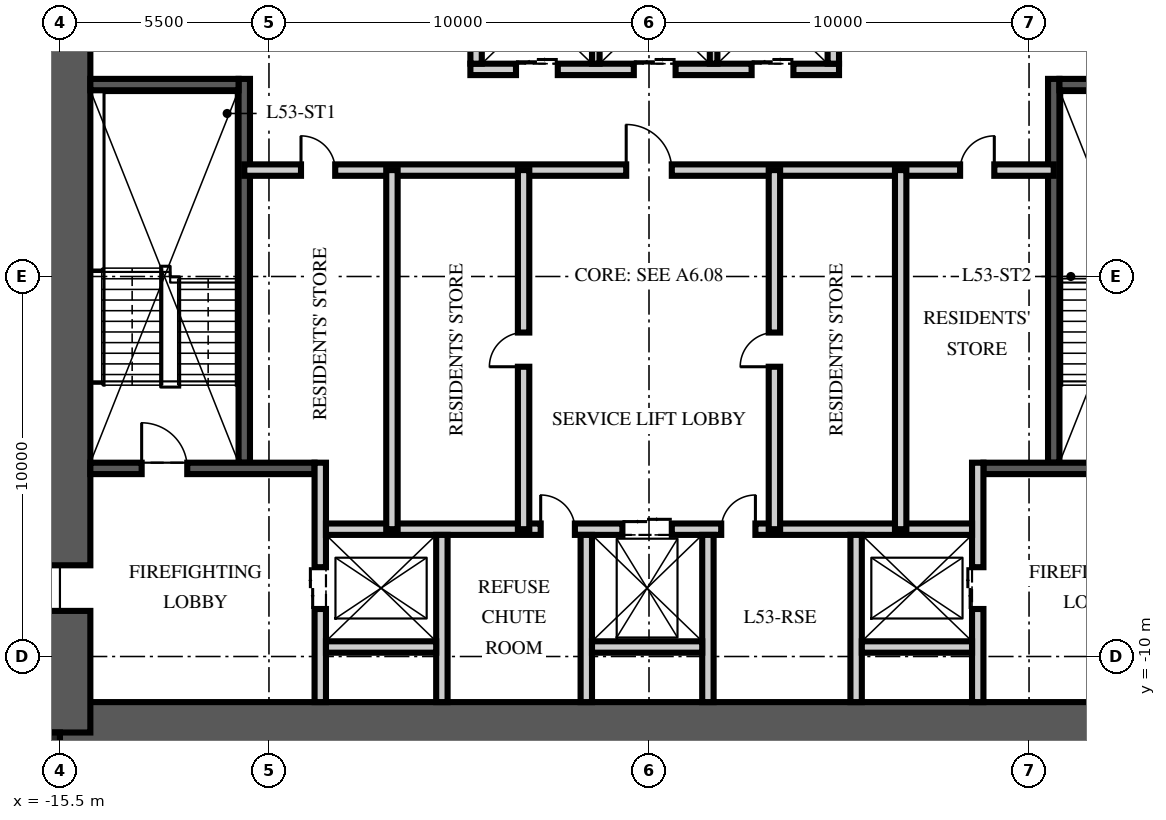
"""IFC4 building model, lengths in metres.
Left out: names, types, materials, properties, quantities, classifications, styles, units other than length and angle.
Written with IfcOpenShell. Run it as: python <this file> out.ifc"""

import sys

from ifc_helpers import new_model, si_unit, direction, frame, frame_2d, origin, origin_2d, place, context, subcontext, project, spatial, rectangle, extrude, element, fill, save


model = new_model("IFC4")
c1 = context("Model", 3, precision=1e-05, world=origin(), true_north=direction((0.0, 1.0)))
c2 = subcontext(c1, "Body", "Model", "MODEL_VIEW")
j1 = project(units=[si_unit("LENGTHUNIT", "METRE"), si_unit("PLANEANGLEUNIT", "RADIAN")], contexts=[c1])
p1 = place(None, origin())
s1 = spatial("IfcSite", under=j1, at=p1, CompositionType="ELEMENT")
p2 = place(p1, origin())
s2 = spatial("IfcBuilding", under=s1, at=p2, CompositionType="ELEMENT")
p3 = place(p2, frame((0.0, 0.0, 214.5)))
s3 = spatial("IfcBuildingStorey", under=s2, at=p3, CompositionType="ELEMENT", Elevation=214.5)
p4 = place(p3, frame((-15.5, -12.0, -0.25), z_axis=(0.0, 0.0, 1.0), x_axis=(1.0, 0.0, 0.0)))
e1 = element("IfcWall", 1, at=p4, inside=s3, PredefinedType="SHEAR", context=c2, shape_type="SweptSolid", body=[
    extrude(rectangle(XDim=31.0, YDim=1.6, at=frame_2d((15.5, 0.0))), origin(), (0.0, 0.0, 1.0), 3.75),
])
p5 = place(p3, frame((-15.5, -12.0, -0.25), z_axis=(0.0, 0.0, 1.0), x_axis=(0.0, 1.0, 0.0)))
e2 = element("IfcWall", 2, at=p5, inside=s3, PredefinedType="SHEAR", context=c2, shape_type="SweptSolid", body=[
    extrude(rectangle(XDim=24.0, YDim=1.6, at=frame_2d((12.0, 0.0))), origin(), (0.0, 0.0, 1.0), 3.75),
])
p6 = place(p5, frame((3.2, 0.0, 0.25)))
e3 = element("IfcOpeningElement", 3, at=p6, cuts=e2, PredefinedType="OPENING", context=c2, shape_type="SweptSolid", body=[
    extrude(rectangle(XDim=1.2, YDim=2.1, at=frame_2d((0.6, 1.05))), frame((0.0, 0.81, 0.0), z_axis=(0.0, -1.0, 0.0), x_axis=(1.0, 0.0, 0.0)), (0.0, 0.0, 1.0), 1.62),
])
p7 = place(p5, frame((19.3, 0.0, 0.25)))
e4 = element("IfcOpeningElement", 4, at=p7, cuts=e2, PredefinedType="OPENING", context=c2, shape_type="SweptSolid", body=[
    extrude(rectangle(XDim=1.8, YDim=2.1, at=frame_2d((0.9, 1.05))), frame((0.0, 0.81, 0.0), z_axis=(0.0, -1.0, 0.0), x_axis=(1.0, 0.0, 0.0)), (0.0, 0.0, 1.0), 1.62),
])
p8 = place(p3, frame((-15.9, -12.4, -0.25), z_axis=(0.0, 0.0, 1.0), x_axis=(1.0, 0.0, 0.0)))
e5 = element("IfcColumn", 5, at=p8, inside=s3, PredefinedType="COLUMN", context=c2, shape_type="SweptSolid", body=[
    extrude(rectangle(XDim=0.8, YDim=0.8, at=origin_2d()), origin(), (0.0, 0.0, 1.0), 3.75),
])
p9 = place(p3, frame((-10.65, -4.9, 0.0), z_axis=(0.0, 0.0, 1.0), x_axis=(0.0, 1.0, 0.0)))
e6 = element("IfcWall", 6, at=p9, inside=s3, PredefinedType="SOLIDWALL", context=c2, shape_type="SweptSolid", body=[
    extrude(rectangle(XDim=10.1, YDim=0.3, at=frame_2d((5.05, 0.0))), origin(), (0.0, 0.0, 1.0), 3.5),
])
p10 = place(p3, frame((-14.7, -5.05, 0.0), z_axis=(0.0, 0.0, 1.0), x_axis=(1.0, 0.0, 0.0)))
e7 = element("IfcWall", 7, at=p10, inside=s3, PredefinedType="SOLIDWALL", context=c2, shape_type="SweptSolid", body=[
    extrude(rectangle(XDim=5.9, YDim=0.3, at=frame_2d((2.95, 0.0))), origin(), (0.0, 0.0, 1.0), 3.5),
])
p11 = place(p10, frame((1.35, 0.0, 0.0)))
e8 = element("IfcOpeningElement", 8, at=p11, cuts=e7, PredefinedType="OPENING", context=c2, shape_type="SweptSolid", body=[
    extrude(rectangle(XDim=1.2, YDim=2.1, at=frame_2d((0.6, 1.05))), frame((0.0, 0.16, 0.0), z_axis=(0.0, -1.0, 0.0), x_axis=(1.0, 0.0, 0.0)), (0.0, 0.0, 1.0), 0.32),
])
p12 = place(p3, frame((-14.7, 5.05, 0.0), z_axis=(0.0, 0.0, 1.0), x_axis=(1.0, 0.0, 0.0)))
e9 = element("IfcWall", 9, at=p12, inside=s3, PredefinedType="SOLIDWALL", context=c2, shape_type="SweptSolid", body=[
    extrude(rectangle(XDim=3.9, YDim=0.3, at=frame_2d((1.95, 0.0))), origin(), (0.0, 0.0, 1.0), 3.5),
])
p13 = place(p3, frame((-8.65, -11.2, 0.0), z_axis=(0.0, 0.0, 1.0), x_axis=(0.0, 1.0, 0.0)))
e10 = element("IfcWall", 10, at=p13, inside=s3, PredefinedType="PARTITIONING", context=c2, shape_type="SweptSolid", body=[
    extrude(rectangle(XDim=6.3, YDim=0.3, at=frame_2d((3.15, 0.0))), origin(), (0.0, 0.0, 1.0), 3.5),
])
p14 = place(p13, frame((2.45, 0.0, 0.0)))
e11 = element("IfcOpeningElement", 11, at=p14, cuts=e10, PredefinedType="OPENING", context=c2, shape_type="SweptSolid", body=[
    extrude(rectangle(XDim=1.1, YDim=2.1, at=frame_2d((0.55, 1.05))), frame((0.0, 0.16, 0.0), z_axis=(0.0, -1.0, 0.0), x_axis=(1.0, 0.0, 0.0)), (0.0, 0.0, 1.0), 0.32),
])
p15 = place(p3, frame((10.65, -4.9, 0.0), z_axis=(0.0, 0.0, 1.0), x_axis=(0.0, 1.0, 0.0)))
e12 = element("IfcWall", 12, at=p15, inside=s3, PredefinedType="SOLIDWALL", context=c2, shape_type="SweptSolid", body=[
    extrude(rectangle(XDim=10.1, YDim=0.3, at=frame_2d((5.05, 0.0))), origin(), (0.0, 0.0, 1.0), 3.5),
])
p16 = place(p3, frame((14.7, -5.05, 0.0), z_axis=(0.0, 0.0, 1.0), x_axis=(-1.0, 0.0, 0.0)))
e13 = element("IfcWall", 13, at=p16, inside=s3, PredefinedType="SOLIDWALL", context=c2, shape_type="SweptSolid", body=[
    extrude(rectangle(XDim=5.9, YDim=0.3, at=frame_2d((2.95, 0.0))), origin(), (0.0, 0.0, 1.0), 3.5),
])
p17 = place(p16, frame((1.35, 0.0, 0.0)))
e14 = element("IfcOpeningElement", 14, at=p17, cuts=e13, PredefinedType="OPENING", context=c2, shape_type="SweptSolid", body=[
    extrude(rectangle(XDim=1.2, YDim=2.1, at=frame_2d((0.6, 1.05))), frame((0.0, 0.16, 0.0), z_axis=(0.0, -1.0, 0.0), x_axis=(1.0, 0.0, 0.0)), (0.0, 0.0, 1.0), 0.32),
])
p18 = place(p3, frame((14.7, 5.05, 0.0), z_axis=(0.0, 0.0, 1.0), x_axis=(-1.0, 0.0, 0.0)))
e15 = element("IfcWall", 15, at=p18, inside=s3, PredefinedType="SOLIDWALL", context=c2, shape_type="SweptSolid", body=[
    extrude(rectangle(XDim=3.9, YDim=0.3, at=frame_2d((1.95, 0.0))), origin(), (0.0, 0.0, 1.0), 3.5),
])
p19 = place(p3, frame((8.65, -11.2, 0.0), z_axis=(0.0, 0.0, 1.0), x_axis=(0.0, 1.0, 0.0)))
e16 = element("IfcWall", 16, at=p19, inside=s3, PredefinedType="PARTITIONING", context=c2, shape_type="SweptSolid", body=[
    extrude(rectangle(XDim=6.3, YDim=0.3, at=frame_2d((3.15, 0.0))), origin(), (0.0, 0.0, 1.0), 3.5),
])
p20 = place(p19, frame((2.45, 0.0, 0.0)))
e17 = element("IfcOpeningElement", 17, at=p20, cuts=e16, PredefinedType="OPENING", context=c2, shape_type="SweptSolid", body=[
    extrude(rectangle(XDim=1.1, YDim=2.1, at=frame_2d((0.55, 1.05))), frame((0.0, 0.16, 0.0), z_axis=(0.0, -1.0, 0.0), x_axis=(1.0, 0.0, 0.0)), (0.0, 0.0, 1.0), 0.32),
])
p21 = place(p3, frame((-8.5, -6.65, 0.0), z_axis=(0.0, 0.0, 1.0), x_axis=(1.0, 0.0, 0.0)))
e18 = element("IfcWall", 18, at=p21, inside=s3, PredefinedType="PARTITIONING", context=c2, shape_type="SweptSolid", body=[
    extrude(rectangle(XDim=17.0, YDim=0.3, at=frame_2d((8.5, 0.0))), origin(), (0.0, 0.0, 1.0), 3.5),
])
p22 = place(p21, frame((7.8, 0.0, 0.0)))
e19 = element("IfcOpeningElement", 19, at=p22, cuts=e18, PredefinedType="OPENING", context=c2, shape_type="SweptSolid", body=[
    extrude(rectangle(XDim=1.3, YDim=2.4, at=frame_2d((0.65, 1.2))), frame((0.0, 0.16, 0.0), z_axis=(0.0, -1.0, 0.0), x_axis=(1.0, 0.0, 0.0)), (0.0, 0.0, 1.0), 0.32),
])
p23 = place(p21, frame((5.65, 0.0, 0.0)))
e20 = element("IfcOpeningElement", 20, at=p23, cuts=e18, PredefinedType="OPENING", context=c2, shape_type="SweptSolid", body=[
    extrude(rectangle(XDim=0.9, YDim=2.1, at=frame_2d((0.45, 1.05))), frame((0.0, 0.16, 0.0), z_axis=(0.0, -1.0, 0.0), x_axis=(1.0, 0.0, 0.0)), (0.0, 0.0, 1.0), 0.32),
])
p24 = place(p21, frame((10.4, 0.0, 0.0)))
e21 = element("IfcOpeningElement", 21, at=p24, cuts=e18, PredefinedType="OPENING", context=c2, shape_type="SweptSolid", body=[
    extrude(rectangle(XDim=0.9, YDim=2.1, at=frame_2d((0.45, 1.05))), frame((0.0, 0.16, 0.0), z_axis=(0.0, -1.0, 0.0), x_axis=(1.0, 0.0, 0.0)), (0.0, 0.0, 1.0), 0.32),
])
for number, where, z_axis, x_axis in (
    (22, (-5.45, -11.2, 0.0), (0.0, 0.0, 1.0), (0.0, 1.0, 0.0)),
    (23, (-1.65, -11.2, 0.0), (0.0, 0.0, 1.0), (0.0, 1.0, 0.0)),
    (24, (1.55, -11.2, 0.0), (0.0, 0.0, 1.0), (0.0, 1.0, 0.0)),
    (25, (5.45, -11.2, 0.0), (0.0, 0.0, 1.0), (0.0, 1.0, 0.0)),
):
    element("IfcWall", number, at=place(p3, frame(where, z_axis=z_axis, x_axis=x_axis)), inside=s3, PredefinedType="PARTITIONING", context=c2, shape_type="SweptSolid", body=[
        extrude(rectangle(XDim=4.4, YDim=0.3, at=frame_2d((2.2, 0.0))), origin(), (0.0, 0.0, 1.0), 3.5),
    ])
for number, where, z_axis, x_axis in (
    (26, (-8.5, -9.75, 0.0), (0.0, 0.0, 1.0), (1.0, 0.0, 0.0)),
    (27, (-1.5, -9.75, 0.0), (0.0, 0.0, 1.0), (1.0, 0.0, 0.0)),
    (28, (5.6, -9.75, 0.0), (0.0, 0.0, 1.0), (1.0, 0.0, 0.0)),
):
    element("IfcWall", number, at=place(p3, frame(where, z_axis=z_axis, x_axis=x_axis)), inside=s3, PredefinedType="PARTITIONING", context=c2, shape_type="SweptSolid", body=[
        extrude(rectangle(XDim=2.9, YDim=0.3, at=frame_2d((1.45, 0.0))), origin(), (0.0, 0.0, 1.0), 3.5),
    ])
p25 = place(p3, frame((-4.7, 5.45, 0.0), z_axis=(0.0, 0.0, 1.0), x_axis=(1.0, 0.0, 0.0)))
e29 = element("IfcWall", 29, at=p25, inside=s3, PredefinedType="PARTITIONING", context=c2, shape_type="SweptSolid", body=[
    extrude(rectangle(XDim=9.7, YDim=0.3, at=frame_2d((4.85, 0.0))), origin(), (0.0, 0.0, 1.0), 3.5),
])
p26 = place(p25, frame((1.2, 0.0, 0.0)))
e30 = element("IfcOpeningElement", 30, at=p26, cuts=e29, PredefinedType="OPENING", context=c2, shape_type="SweptSolid", body=[
    extrude(rectangle(XDim=1.1, YDim=2.1, at=frame_2d((0.55, 1.05))), frame((0.0, 0.16, 0.0), z_axis=(0.0, -1.0, 0.0), x_axis=(1.0, 0.0, 0.0)), (0.0, 0.0, 1.0), 0.32),
])
p27 = place(p25, frame((4.3, 0.0, 0.0)))
e31 = element("IfcOpeningElement", 31, at=p27, cuts=e29, PredefinedType="OPENING", context=c2, shape_type="SweptSolid", body=[
    extrude(rectangle(XDim=1.1, YDim=2.1, at=frame_2d((0.55, 1.05))), frame((0.0, 0.16, 0.0), z_axis=(0.0, -1.0, 0.0), x_axis=(1.0, 0.0, 0.0)), (0.0, 0.0, 1.0), 0.32),
])
p28 = place(p25, frame((7.4, 0.0, 0.0)))
e32 = element("IfcOpeningElement", 32, at=p28, cuts=e29, PredefinedType="OPENING", context=c2, shape_type="SweptSolid", body=[
    extrude(rectangle(XDim=1.1, YDim=2.1, at=frame_2d((0.55, 1.05))), frame((0.0, 0.16, 0.0), z_axis=(0.0, -1.0, 0.0), x_axis=(1.0, 0.0, 0.0)), (0.0, 0.0, 1.0), 0.32),
])
for number, where, z_axis, x_axis in (
    (33, (-4.55, 5.6, 0.0), (0.0, 0.0, 1.0), (0.0, 1.0, 0.0)),
    (34, (4.85, 5.6, 0.0), (0.0, 0.0, 1.0), (0.0, 1.0, 0.0)),
):
    element("IfcWall", number, at=place(p3, frame(where, z_axis=z_axis, x_axis=x_axis)), inside=s3, PredefinedType="PARTITIONING", context=c2, shape_type="SweptSolid", body=[
        extrude(rectangle(XDim=2.8, YDim=0.3, at=frame_2d((1.4, 0.0))), origin(), (0.0, 0.0, 1.0), 3.5),
    ])
for number, where, z_axis, x_axis in (
    (35, (-1.4, 5.6, 0.0), (0.0, 0.0, 1.0), (0.0, 1.0, 0.0)),
    (36, (1.7, 5.6, 0.0), (0.0, 0.0, 1.0), (0.0, 1.0, 0.0)),
):
    element("IfcWall", number, at=place(p3, frame(where, z_axis=z_axis, x_axis=x_axis)), inside=s3, PredefinedType="PARTITIONING", context=c2, shape_type="SweptSolid", body=[
        extrude(rectangle(XDim=2.8, YDim=0.2, at=frame_2d((1.4, 0.0))), origin(), (0.0, 0.0, 1.0), 3.5),
    ])
p29 = place(p3, frame((-10.65, 2.8, 0.0), z_axis=(0.0, 0.0, 1.0), x_axis=(1.0, 0.0, 0.0)))
e37 = element("IfcWall", 37, at=p29, inside=s3, PredefinedType="PARTITIONING", context=c2, shape_type="SweptSolid", body=[
    extrude(rectangle(XDim=21.3, YDim=0.3, at=frame_2d((10.65, 0.0))), origin(), (0.0, 0.0, 1.0), 3.5),
])
p30 = place(p29, frame((10.05, 0.0, 0.0)))
e38 = element("IfcOpeningElement", 38, at=p30, cuts=e37, PredefinedType="OPENING", context=c2, shape_type="SweptSolid", body=[
    extrude(rectangle(XDim=1.2, YDim=2.1, at=frame_2d((0.6, 1.05))), frame((0.0, 0.16, 0.0), z_axis=(0.0, -1.0, 0.0), x_axis=(1.0, 0.0, 0.0)), (0.0, 0.0, 1.0), 0.32),
])
p31 = place(p29, frame((1.493, 0.0, 0.0)))
e39 = element("IfcOpeningElement", 39, at=p31, cuts=e37, PredefinedType="OPENING", context=c2, shape_type="SweptSolid", body=[
    extrude(rectangle(XDim=0.9, YDim=2.1, at=frame_2d((0.45, 1.05))), frame((0.0, 0.16, 0.0), z_axis=(0.0, -1.0, 0.0), x_axis=(1.0, 0.0, 0.0)), (0.0, 0.0, 1.0), 0.32),
])
p32 = place(p29, frame((18.836, 0.0, 0.0)))
e40 = element("IfcOpeningElement", 40, at=p32, cuts=e37, PredefinedType="OPENING", context=c2, shape_type="SweptSolid", body=[
    extrude(rectangle(XDim=0.9, YDim=2.1, at=frame_2d((0.45, 1.05))), frame((0.0, 0.16, 0.0), z_axis=(0.0, -1.0, 0.0), x_axis=(1.0, 0.0, 0.0)), (0.0, 0.0, 1.0), 0.32),
])
p33 = place(p3, frame((-3.3, -6.65, 0.0), z_axis=(0.0, 0.0, 1.0), x_axis=(0.0, 1.0, 0.0)))
e41 = element("IfcWall", 41, at=p33, inside=s3, PredefinedType="PARTITIONING", context=c2, shape_type="SweptSolid", body=[
    extrude(rectangle(XDim=9.45, YDim=0.3, at=frame_2d((4.725, 0.0))), origin(), (0.0, 0.0, 1.0), 3.5),
])
p34 = place(p33, frame((4.275, 0.0, 0.0)))
e42 = element("IfcOpeningElement", 42, at=p34, cuts=e41, PredefinedType="OPENING", context=c2, shape_type="SweptSolid", body=[
    extrude(rectangle(XDim=0.9, YDim=2.1, at=frame_2d((0.45, 1.05))), frame((0.0, 0.16, 0.0), z_axis=(0.0, -1.0, 0.0), x_axis=(1.0, 0.0, 0.0)), (0.0, 0.0, 1.0), 0.32),
])
p35 = place(p3, frame((3.3, -6.65, 0.0), z_axis=(0.0, 0.0, 1.0), x_axis=(0.0, 1.0, 0.0)))
e43 = element("IfcWall", 43, at=p35, inside=s3, PredefinedType="PARTITIONING", context=c2, shape_type="SweptSolid", body=[
    extrude(rectangle(XDim=9.45, YDim=0.3, at=frame_2d((4.725, 0.0))), origin(), (0.0, 0.0, 1.0), 3.5),
])
p36 = place(p35, frame((4.275, 0.0, 0.0)))
e44 = element("IfcOpeningElement", 44, at=p36, cuts=e43, PredefinedType="OPENING", context=c2, shape_type="SweptSolid", body=[
    extrude(rectangle(XDim=0.9, YDim=2.1, at=frame_2d((0.45, 1.05))), frame((0.0, 0.16, 0.0), z_axis=(0.0, -1.0, 0.0), x_axis=(1.0, 0.0, 0.0)), (0.0, 0.0, 1.0), 0.32),
])
for number, where, z_axis, x_axis in (
    (45, (-6.764, -6.65, 0.0), (0.0, 0.0, 1.0), (0.0, 1.0, 0.0)),
    (46, (6.622, -6.65, 0.0), (0.0, 0.0, 1.0), (0.0, 1.0, 0.0)),
):
    element("IfcWall", number, at=place(p3, frame(where, z_axis=z_axis, x_axis=x_axis)), inside=s3, PredefinedType="PARTITIONING", context=c2, shape_type="SweptSolid", body=[
        extrude(rectangle(XDim=9.45, YDim=0.3, at=frame_2d((4.725, 0.0))), origin(), (0.0, 0.0, 1.0), 3.5),
    ])
p37 = place(p11, origin())
e47 = element("IfcDoor", 47, at=p37, inside=s3, OperationType="SINGLE_SWING_LEFT", PredefinedType="DOOR", context=c2, shape_type="SweptSolid", body=[
    extrude(rectangle(XDim=1.2, YDim=2.1, at=frame_2d((0.6, 1.05))), frame((0.0, 0.025, 0.0), z_axis=(0.0, -1.0, 0.0), x_axis=(1.0, 0.0, 0.0)), (0.0, 0.0, 1.0), 0.05),
])
fill(e8, e47)
p38 = place(p6, origin())
e48 = element("IfcDoor", 48, at=p38, inside=s3, OperationType="SINGLE_SWING_LEFT", PredefinedType="DOOR", context=c2, shape_type="SweptSolid", body=[
    extrude(rectangle(XDim=1.2, YDim=2.1, at=frame_2d((0.6, 1.05))), frame((0.0, 0.025, 0.0), z_axis=(0.0, -1.0, 0.0), x_axis=(1.0, 0.0, 0.0)), (0.0, 0.0, 1.0), 0.05),
])
fill(e3, e48)
p39 = place(p14, origin())
e49 = element("IfcDoor", 49, at=p39, inside=s3, OperationType="DOUBLE_DOOR_SLIDING", PredefinedType="DOOR", context=c2, shape_type="SweptSolid", body=[
    extrude(rectangle(XDim=1.1, YDim=2.1, at=frame_2d((0.55, 1.05))), frame((0.0, 0.025, 0.0), z_axis=(0.0, -1.0, 0.0), x_axis=(1.0, 0.0, 0.0)), (0.0, 0.0, 1.0), 0.05),
])
fill(e11, e49)
p40 = place(p20, origin())
e50 = element("IfcDoor", 50, at=p40, inside=s3, OperationType="DOUBLE_DOOR_SLIDING", PredefinedType="DOOR", context=c2, shape_type="SweptSolid", body=[
    extrude(rectangle(XDim=1.1, YDim=2.1, at=frame_2d((0.55, 1.05))), frame((0.0, 0.025, 0.0), z_axis=(0.0, -1.0, 0.0), x_axis=(1.0, 0.0, 0.0)), (0.0, 0.0, 1.0), 0.05),
])
fill(e17, e50)
p41 = place(p26, origin())
e51 = element("IfcDoor", 51, at=p41, inside=s3, OperationType="DOUBLE_DOOR_SLIDING", PredefinedType="DOOR", context=c2, shape_type="SweptSolid", body=[
    extrude(rectangle(XDim=1.1, YDim=2.1, at=frame_2d((0.55, 1.05))), frame((0.0, 0.025, 0.0), z_axis=(0.0, -1.0, 0.0), x_axis=(1.0, 0.0, 0.0)), (0.0, 0.0, 1.0), 0.05),
])
fill(e30, e51)
p42 = place(p27, origin())
e52 = element("IfcDoor", 52, at=p42, inside=s3, OperationType="DOUBLE_DOOR_SLIDING", PredefinedType="DOOR", context=c2, shape_type="SweptSolid", body=[
    extrude(rectangle(XDim=1.1, YDim=2.1, at=frame_2d((0.55, 1.05))), frame((0.0, 0.025, 0.0), z_axis=(0.0, -1.0, 0.0), x_axis=(1.0, 0.0, 0.0)), (0.0, 0.0, 1.0), 0.05),
])
fill(e31, e52)
p43 = place(p28, origin())
e53 = element("IfcDoor", 53, at=p43, inside=s3, OperationType="DOUBLE_DOOR_SLIDING", PredefinedType="DOOR", context=c2, shape_type="SweptSolid", body=[
    extrude(rectangle(XDim=1.1, YDim=2.1, at=frame_2d((0.55, 1.05))), frame((0.0, 0.025, 0.0), z_axis=(0.0, -1.0, 0.0), x_axis=(1.0, 0.0, 0.0)), (0.0, 0.0, 1.0), 0.05),
])
fill(e32, e53)
p44 = place(p22, origin())
e54 = element("IfcDoor", 54, at=p44, inside=s3, OperationType="DOUBLE_DOOR_SLIDING", PredefinedType="DOOR", context=c2, shape_type="SweptSolid", body=[
    extrude(rectangle(XDim=1.3, YDim=2.4, at=frame_2d((0.65, 1.2))), frame((0.0, 0.025, 0.0), z_axis=(0.0, -1.0, 0.0), x_axis=(1.0, 0.0, 0.0)), (0.0, 0.0, 1.0), 0.05),
])
fill(e19, e54)
p45 = place(p30, origin())
e55 = element("IfcDoor", 55, at=p45, inside=s3, OperationType="SINGLE_SWING_LEFT", PredefinedType="DOOR", context=c2, shape_type="SweptSolid", body=[
    extrude(rectangle(XDim=1.2, YDim=2.1, at=frame_2d((0.6, 1.05))), frame((0.0, 0.025, 0.0), z_axis=(0.0, -1.0, 0.0), x_axis=(1.0, 0.0, 0.0)), (0.0, 0.0, 1.0), 0.05),
])
fill(e38, e55)
p46 = place(p23, origin())
e56 = element("IfcDoor", 56, at=p46, inside=s3, OperationType="SINGLE_SWING_LEFT", PredefinedType="DOOR", context=c2, shape_type="SweptSolid", body=[
    extrude(rectangle(XDim=0.9, YDim=2.1, at=frame_2d((0.45, 1.05))), frame((0.0, 0.025, 0.0), z_axis=(0.0, -1.0, 0.0), x_axis=(1.0, 0.0, 0.0)), (0.0, 0.0, 1.0), 0.05),
])
fill(e20, e56)
p47 = place(p24, origin())
e57 = element("IfcDoor", 57, at=p47, inside=s3, OperationType="SINGLE_SWING_RIGHT", PredefinedType="DOOR", context=c2, shape_type="SweptSolid", body=[
    extrude(rectangle(XDim=0.9, YDim=2.1, at=frame_2d((0.45, 1.05))), frame((0.0, 0.025, 0.0), z_axis=(0.0, -1.0, 0.0), x_axis=(1.0, 0.0, 0.0)), (0.0, 0.0, 1.0), 0.05),
])
fill(e21, e57)
p48 = place(p34, origin())
e58 = element("IfcDoor", 58, at=p48, inside=s3, OperationType="SINGLE_SWING_LEFT", PredefinedType="DOOR", context=c2, shape_type="SweptSolid", body=[
    extrude(rectangle(XDim=0.9, YDim=2.1, at=frame_2d((0.45, 1.05))), frame((0.0, 0.025, 0.0), z_axis=(0.0, -1.0, 0.0), x_axis=(1.0, 0.0, 0.0)), (0.0, 0.0, 1.0), 0.05),
])
fill(e42, e58)
p49 = place(p31, origin())
e59 = element("IfcDoor", 59, at=p49, inside=s3, OperationType="SINGLE_SWING_LEFT", PredefinedType="DOOR", context=c2, shape_type="SweptSolid", body=[
    extrude(rectangle(XDim=0.9, YDim=2.1, at=frame_2d((0.45, 1.05))), frame((0.0, 0.025, 0.0), z_axis=(0.0, -1.0, 0.0), x_axis=(1.0, 0.0, 0.0)), (0.0, 0.0, 1.0), 0.05),
])
fill(e39, e59)
p50 = place(p36, origin())
e60 = element("IfcDoor", 60, at=p50, inside=s3, OperationType="SINGLE_SWING_LEFT", PredefinedType="DOOR", context=c2, shape_type="SweptSolid", body=[
    extrude(rectangle(XDim=0.9, YDim=2.1, at=frame_2d((0.45, 1.05))), frame((0.0, 0.025, 0.0), z_axis=(0.0, -1.0, 0.0), x_axis=(1.0, 0.0, 0.0)), (0.0, 0.0, 1.0), 0.05),
])
fill(e44, e60)
p51 = place(p32, origin())
e61 = element("IfcDoor", 61, at=p51, inside=s3, OperationType="SINGLE_SWING_RIGHT", PredefinedType="DOOR", context=c2, shape_type="SweptSolid", body=[
    extrude(rectangle(XDim=0.9, YDim=2.1, at=frame_2d((0.45, 1.05))), frame((0.0, 0.025, 0.0), z_axis=(0.0, -1.0, 0.0), x_axis=(1.0, 0.0, 0.0)), (0.0, 0.0, 1.0), 0.05),
])
fill(e40, e61)
save(model, sys.argv[1])
